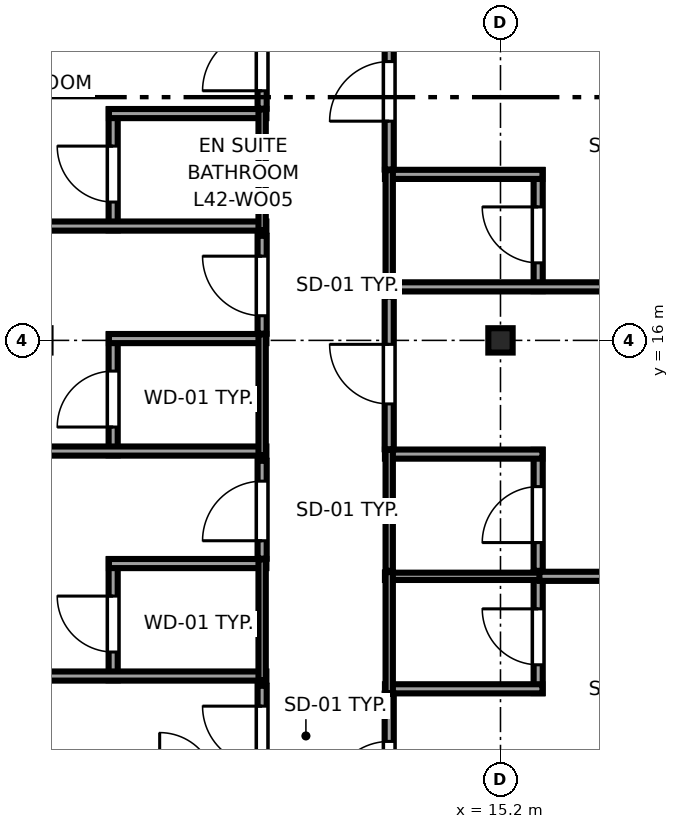
"""IFC4 building model, lengths in metres.
Left out: names, types, materials, properties, quantities, classifications, styles, units other than length and angle.
Written with IfcOpenShell. Run it as: python <this file> out.ifc"""

import sys

from ifc_helpers import new_model, si_unit, direction, frame, frame_2d, origin, origin_2d, place, context, subcontext, project, spatial, rectangle, i_section, extrude, source, transform, mapped, element, fill, save


model = new_model("IFC4")
c1 = context("Model", 3, precision=1e-05, world=origin(), true_north=direction((0.0, 1.0)))
c2 = subcontext(c1, "Body", "Model", "MODEL_VIEW")
j1 = project(units=[si_unit("LENGTHUNIT", "METRE"), si_unit("PLANEANGLEUNIT", "RADIAN")], contexts=[c1])
p1 = place(None, origin())
s1 = spatial("IfcSite", under=j1, at=p1, CompositionType="ELEMENT")
p2 = place(p1, origin())
s2 = spatial("IfcBuilding", under=s1, at=p2, CompositionType="ELEMENT")
p3 = place(p2, frame((0.0, 0.0, 161.25)))
s3 = spatial("IfcBuildingStorey", under=s2, at=p3, CompositionType="ELEMENT", Elevation=161.25)
m1 = source(origin(), c2, "Body", "SweptSolid", [
    extrude(i_section(OverallWidth=0.4, OverallDepth=0.4, WebThickness=0.02, FlangeThickness=0.035, at=origin_2d()), origin(), (0.0, 0.0, 1.0), 3.55),
])
p4 = place(p3, frame((15.2, 16.0, 0.0), z_axis=(0.0, 0.0, 1.0), x_axis=(1.0, 0.0, 0.0)))
e1 = element("IfcColumn", 1, at=p4, inside=s3, PredefinedType="COLUMN", context=c2, shape_type="MappedRepresentation", body=[
    mapped(m1, transform((0.0, 0.0, 0.0), x_axis=(1.0, 0.0, 0.0), y_axis=(0.0, 1.0, 0.0), z_axis=(0.0, 0.0, 1.0), scale=1.0)),
])
p5 = place(p3, frame((8.83, 10.41, 0.0), z_axis=(0.0, 0.0, 1.0), x_axis=(0.0, 1.0, 0.0)))
e2 = element("IfcWall", 2, at=p5, inside=s3, PredefinedType="PARTITIONING", context=c2, shape_type="SweptSolid", body=[
    extrude(rectangle(XDim=1.99, YDim=0.15, at=frame_2d((0.995, 0.0))), origin(), (0.0, 0.0, 1.0), 3.37),
])
p6 = place(p5, frame((0.465, 0.0, 0.0)))
e3 = element("IfcOpeningElement", 3, at=p6, cuts=e2, PredefinedType="OPENING", context=c2, shape_type="SweptSolid", body=[
    extrude(rectangle(XDim=0.92, YDim=2.01, at=frame_2d((0.46, 1.005))), frame((0.0, 0.085, 0.0), z_axis=(0.0, -1.0, 0.0), x_axis=(1.0, 0.0, 0.0)), (0.0, 0.0, 1.0), 0.17),
])
p7 = place(p3, frame((3.005, 10.48, 0.0), z_axis=(0.0, 0.0, 1.0), x_axis=(1.0, 0.0, 0.0)))
e4 = element("IfcWall", 4, at=p7, inside=s3, PredefinedType="PARTITIONING", context=c2, shape_type="SweptSolid", body=[
    extrude(rectangle(XDim=8.345, YDim=0.15, at=frame_2d((4.173, 0.0))), origin(), (0.0, 0.0, 1.0), 3.37),
])
p8 = place(p3, frame((8.76, 12.33, 0.0), z_axis=(0.0, 0.0, 1.0), x_axis=(1.0, 0.0, 0.0)))
e5 = element("IfcWall", 5, at=p8, inside=s3, PredefinedType="PARTITIONING", context=c2, shape_type="SweptSolid", body=[
    extrude(rectangle(XDim=2.59, YDim=0.15, at=frame_2d((1.295, 0.0))), origin(), (0.0, 0.0, 1.0), 3.37),
])
p9 = place(p3, frame((11.28, 10.41, 0.0), z_axis=(0.0, 0.0, 1.0), x_axis=(0.0, 1.0, 0.0)))
e6 = element("IfcWall", 6, at=p9, inside=s3, PredefinedType="PLUMBINGWALL", context=c2, shape_type="SweptSolid", body=[
    extrude(rectangle(XDim=1.99, YDim=0.12, at=frame_2d((0.995, 0.0))), origin(), (0.0, 0.0, 1.0), 3.001),
])
p10 = place(p3, frame((8.83, 14.11, 0.0), z_axis=(0.0, 0.0, 1.0), x_axis=(0.0, 1.0, 0.0)))
e7 = element("IfcWall", 7, at=p10, inside=s3, PredefinedType="PARTITIONING", context=c2, shape_type="SweptSolid", body=[
    extrude(rectangle(XDim=1.99, YDim=0.15, at=frame_2d((0.995, 0.0))), origin(), (0.0, 0.0, 1.0), 3.37),
])
p11 = place(p10, frame((0.465, 0.0, 0.0)))
e8 = element("IfcOpeningElement", 8, at=p11, cuts=e7, PredefinedType="OPENING", context=c2, shape_type="SweptSolid", body=[
    extrude(rectangle(XDim=0.92, YDim=2.01, at=frame_2d((0.46, 1.005))), frame((0.0, 0.085, 0.0), z_axis=(0.0, -1.0, 0.0), x_axis=(1.0, 0.0, 0.0)), (0.0, 0.0, 1.0), 0.17),
])
p12 = place(p3, frame((3.005, 14.18, 0.0), z_axis=(0.0, 0.0, 1.0), x_axis=(1.0, 0.0, 0.0)))
e9 = element("IfcWall", 9, at=p12, inside=s3, PredefinedType="PARTITIONING", context=c2, shape_type="SweptSolid", body=[
    extrude(rectangle(XDim=8.345, YDim=0.15, at=frame_2d((4.173, 0.0))), origin(), (0.0, 0.0, 1.0), 3.37),
])
p13 = place(p3, frame((8.76, 16.03, 0.0), z_axis=(0.0, 0.0, 1.0), x_axis=(1.0, 0.0, 0.0)))
e10 = element("IfcWall", 10, at=p13, inside=s3, PredefinedType="PARTITIONING", context=c2, shape_type="SweptSolid", body=[
    extrude(rectangle(XDim=2.59, YDim=0.15, at=frame_2d((1.295, 0.0))), origin(), (0.0, 0.0, 1.0), 2.758),
])
p14 = place(p3, frame((11.28, 14.11, 0.0), z_axis=(0.0, 0.0, 1.0), x_axis=(0.0, 1.0, 0.0)))
e11 = element("IfcWall", 11, at=p14, inside=s3, PredefinedType="PLUMBINGWALL", context=c2, shape_type="SweptSolid", body=[
    extrude(rectangle(XDim=1.99, YDim=0.12, at=frame_2d((0.995, 0.0))), origin(), (0.0, 0.0, 1.0), 3.001),
])
p15 = place(p3, frame((8.83, 17.81, 0.0), z_axis=(0.0, 0.0, 1.0), x_axis=(0.0, 1.0, 0.0)))
e12 = element("IfcWall", 12, at=p15, inside=s3, PredefinedType="PARTITIONING", context=c2, shape_type="SweptSolid", body=[
    extrude(rectangle(XDim=1.99, YDim=0.15, at=frame_2d((0.995, 0.0))), origin(), (0.0, 0.0, 1.0), 3.37),
])
p16 = place(p15, frame((0.465, 0.0, 0.0)))
e13 = element("IfcOpeningElement", 13, at=p16, cuts=e12, PredefinedType="OPENING", context=c2, shape_type="SweptSolid", body=[
    extrude(rectangle(XDim=0.92, YDim=2.01, at=frame_2d((0.46, 1.005))), frame((0.0, 0.085, 0.0), z_axis=(0.0, -1.0, 0.0), x_axis=(1.0, 0.0, 0.0)), (0.0, 0.0, 1.0), 0.17),
])
p17 = place(p3, frame((3.005, 17.88, 0.0), z_axis=(0.0, 0.0, 1.0), x_axis=(1.0, 0.0, 0.0)))
e14 = element("IfcWall", 14, at=p17, inside=s3, PredefinedType="PARTITIONING", context=c2, shape_type="SweptSolid", body=[
    extrude(rectangle(XDim=8.345, YDim=0.15, at=frame_2d((4.173, 0.0))), origin(), (0.0, 0.0, 1.0), 3.37),
])
p18 = place(p3, frame((8.76, 19.73, 0.0), z_axis=(0.0, 0.0, 1.0), x_axis=(1.0, 0.0, 0.0)))
e15 = element("IfcWall", 15, at=p18, inside=s3, PredefinedType="PARTITIONING", context=c2, shape_type="SweptSolid", body=[
    extrude(rectangle(XDim=2.59, YDim=0.15, at=frame_2d((1.295, 0.0))), origin(), (0.0, 0.0, 1.0), 3.37),
])
p19 = place(p3, frame((11.28, 17.81, 0.0), z_axis=(0.0, 0.0, 1.0), x_axis=(0.0, 1.0, 0.0)))
e16 = element("IfcWall", 16, at=p19, inside=s3, PredefinedType="PLUMBINGWALL", context=c2, shape_type="SweptSolid", body=[
    extrude(rectangle(XDim=1.99, YDim=0.12, at=frame_2d((0.995, 0.0))), origin(), (0.0, 0.0, 1.0), 3.001),
])
p20 = place(p3, frame((15.82, 10.2, 0.0), z_axis=(0.0, 0.0, 1.0), x_axis=(0.0, 1.0, 0.0)))
e17 = element("IfcWall", 17, at=p20, inside=s3, PredefinedType="PARTITIONING", context=c2, shape_type="SweptSolid", body=[
    extrude(rectangle(XDim=1.99, YDim=0.15, at=frame_2d((0.995, 0.0))), origin(), (0.0, 0.0, 1.0), 3.37),
])
p21 = place(p20, frame((0.465, 0.0, 0.0)))
e18 = element("IfcOpeningElement", 18, at=p21, cuts=e17, PredefinedType="OPENING", context=c2, shape_type="SweptSolid", body=[
    extrude(rectangle(XDim=0.92, YDim=2.01, at=frame_2d((0.46, 1.005))), frame((0.0, 0.085, 0.0), z_axis=(0.0, -1.0, 0.0), x_axis=(1.0, 0.0, 0.0)), (0.0, 0.0, 1.0), 0.17),
])
p22 = place(p3, frame((13.3, 10.27, 0.0), z_axis=(0.0, 0.0, 1.0), x_axis=(1.0, 0.0, 0.0)))
e19 = element("IfcWall", 19, at=p22, inside=s3, PredefinedType="PARTITIONING", context=c2, shape_type="SweptSolid", body=[
    extrude(rectangle(XDim=2.59, YDim=0.15, at=frame_2d((1.295, 0.0))), origin(), (0.0, 0.0, 1.0), 3.37),
])
p23 = place(p3, frame((13.3, 12.12, 0.0), z_axis=(0.0, 0.0, 1.0), x_axis=(1.0, 0.0, 0.0)))
e20 = element("IfcWall", 20, at=p23, inside=s3, PredefinedType="PLUMBINGWALL", context=c2, shape_type="SweptSolid", body=[
    extrude(rectangle(XDim=2.59, YDim=0.12, at=frame_2d((1.295, 0.0))), origin(), (0.0, 0.0, 1.0), 3.37),
])
p24 = place(p3, frame((13.37, 10.2, 0.0), z_axis=(0.0, 0.0, 1.0), x_axis=(0.0, 1.0, 0.0)))
e21 = element("IfcWall", 21, at=p24, inside=s3, PredefinedType="PLUMBINGWALL", context=c2, shape_type="SweptSolid", body=[
    extrude(rectangle(XDim=1.99, YDim=0.12, at=frame_2d((0.995, 0.0))), origin(), (0.0, 0.0, 1.0), 3.37),
])
p25 = place(p3, frame((15.82, 12.21, 0.0), z_axis=(0.0, 0.0, 1.0), x_axis=(0.0, 1.0, 0.0)))
e22 = element("IfcWall", 22, at=p25, inside=s3, PredefinedType="PARTITIONING", context=c2, shape_type="SweptSolid", body=[
    extrude(rectangle(XDim=1.99, YDim=0.15, at=frame_2d((0.995, 0.0))), origin(), (0.0, 0.0, 1.0), 3.37),
])
p26 = place(p25, frame((0.465, 0.0, 0.0)))
e23 = element("IfcOpeningElement", 23, at=p26, cuts=e22, PredefinedType="OPENING", context=c2, shape_type="SweptSolid", body=[
    extrude(rectangle(XDim=0.92, YDim=2.01, at=frame_2d((0.46, 1.005))), frame((0.0, 0.085, 0.0), z_axis=(0.0, -1.0, 0.0), x_axis=(1.0, 0.0, 0.0)), (0.0, 0.0, 1.0), 0.17),
])
p27 = place(p3, frame((13.3, 14.13, 0.0), z_axis=(0.0, 0.0, 1.0), x_axis=(1.0, 0.0, 0.0)))
e24 = element("IfcWall", 24, at=p27, inside=s3, PredefinedType="PARTITIONING", context=c2, shape_type="SweptSolid", body=[
    extrude(rectangle(XDim=2.59, YDim=0.15, at=frame_2d((1.295, 0.0))), origin(), (0.0, 0.0, 1.0), 3.37),
])
p28 = place(p3, frame((13.37, 12.21, 0.0), z_axis=(0.0, 0.0, 1.0), x_axis=(0.0, 1.0, 0.0)))
e25 = element("IfcWall", 25, at=p28, inside=s3, PredefinedType="PLUMBINGWALL", context=c2, shape_type="SweptSolid", body=[
    extrude(rectangle(XDim=1.99, YDim=0.12, at=frame_2d((0.995, 0.0))), origin(), (0.0, 0.0, 1.0), 3.37),
])
p29 = place(p3, frame((15.82, 16.81, 0.0), z_axis=(0.0, 0.0, 1.0), x_axis=(0.0, 1.0, 0.0)))
e26 = element("IfcWall", 26, at=p29, inside=s3, PredefinedType="PARTITIONING", context=c2, shape_type="SweptSolid", body=[
    extrude(rectangle(XDim=1.99, YDim=0.15, at=frame_2d((0.995, 0.0))), origin(), (0.0, 0.0, 1.0), 3.37),
])
p30 = place(p29, frame((0.465, 0.0, 0.0)))
e27 = element("IfcOpeningElement", 27, at=p30, cuts=e26, PredefinedType="OPENING", context=c2, shape_type="SweptSolid", body=[
    extrude(rectangle(XDim=0.92, YDim=2.01, at=frame_2d((0.46, 1.005))), frame((0.0, 0.085, 0.0), z_axis=(0.0, -1.0, 0.0), x_axis=(1.0, 0.0, 0.0)), (0.0, 0.0, 1.0), 0.17),
])
p31 = place(p3, frame((13.3, 16.88, 0.0), z_axis=(0.0, 0.0, 1.0), x_axis=(1.0, 0.0, 0.0)))
e28 = element("IfcWall", 28, at=p31, inside=s3, PredefinedType="PARTITIONING", context=c2, shape_type="SweptSolid", body=[
    extrude(rectangle(XDim=9.05, YDim=0.15, at=frame_2d((4.525, 0.0))), origin(), (0.0, 0.0, 1.0), 3.37),
])
p32 = place(p3, frame((13.3, 18.73, 0.0), z_axis=(0.0, 0.0, 1.0), x_axis=(1.0, 0.0, 0.0)))
e29 = element("IfcWall", 29, at=p32, inside=s3, PredefinedType="PARTITIONING", context=c2, shape_type="SweptSolid", body=[
    extrude(rectangle(XDim=2.59, YDim=0.15, at=frame_2d((1.295, 0.0))), origin(), (0.0, 0.0, 1.0), 3.37),
])
p33 = place(p3, frame((13.37, 16.81, 0.0), z_axis=(0.0, 0.0, 1.0), x_axis=(0.0, 1.0, 0.0)))
e30 = element("IfcWall", 30, at=p33, inside=s3, PredefinedType="PLUMBINGWALL", context=c2, shape_type="SweptSolid", body=[
    extrude(rectangle(XDim=1.99, YDim=0.12, at=frame_2d((0.995, 0.0))), origin(), (0.0, 0.0, 1.0), 3.37),
])
p34 = place(p3, frame((11.28, 8.71, 0.0), z_axis=(0.0, 0.0, 1.0), x_axis=(0.0, 1.0, 0.0)))
e31 = element("IfcWall", 31, at=p34, inside=s3, PredefinedType="PARTITIONING", context=c2, shape_type="SweptSolid", body=[
    extrude(rectangle(XDim=1.61, YDim=0.15, at=frame_2d((0.805, 0.0))), origin(), (0.0, 0.0, 1.0), 3.001),
])
p35 = place(p34, frame((0.295, 0.0, 0.0)))
e32 = element("IfcOpeningElement", 32, at=p35, cuts=e31, PredefinedType="OPENING", context=c2, shape_type="SweptSolid", body=[
    extrude(rectangle(XDim=0.98, YDim=2.12, at=frame_2d((0.49, 1.06))), frame((0.0, 0.085, 0.0), z_axis=(0.0, -1.0, 0.0), x_axis=(1.0, 0.0, 0.0)), (0.0, 0.0, 1.0), 0.17),
])
p36 = place(p3, frame((11.28, 12.41, 0.0), z_axis=(0.0, 0.0, 1.0), x_axis=(0.0, 1.0, 0.0)))
e33 = element("IfcWall", 33, at=p36, inside=s3, PredefinedType="PARTITIONING", context=c2, shape_type="SweptSolid", body=[
    extrude(rectangle(XDim=1.61, YDim=0.15, at=frame_2d((0.805, 0.0))), origin(), (0.0, 0.0, 1.0), 3.001),
])
p37 = place(p36, frame((0.295, 0.0, 0.0)))
e34 = element("IfcOpeningElement", 34, at=p37, cuts=e33, PredefinedType="OPENING", context=c2, shape_type="SweptSolid", body=[
    extrude(rectangle(XDim=0.98, YDim=2.12, at=frame_2d((0.49, 1.06))), frame((0.0, 0.085, 0.0), z_axis=(0.0, -1.0, 0.0), x_axis=(1.0, 0.0, 0.0)), (0.0, 0.0, 1.0), 0.17),
])
p38 = place(p3, frame((11.28, 16.11, 0.0), z_axis=(0.0, 0.0, 1.0), x_axis=(0.0, 1.0, 0.0)))
e35 = element("IfcWall", 35, at=p38, inside=s3, PredefinedType="PARTITIONING", context=c2, shape_type="SweptSolid", body=[
    extrude(rectangle(XDim=1.61, YDim=0.15, at=frame_2d((0.805, 0.0))), origin(), (0.0, 0.0, 1.0), 3.001),
])
p39 = place(p38, frame((0.295, 0.0, 0.0)))
e36 = element("IfcOpeningElement", 36, at=p39, cuts=e35, PredefinedType="OPENING", context=c2, shape_type="SweptSolid", body=[
    extrude(rectangle(XDim=0.98, YDim=2.12, at=frame_2d((0.49, 1.06))), frame((0.0, 0.085, 0.0), z_axis=(0.0, -1.0, 0.0), x_axis=(1.0, 0.0, 0.0)), (0.0, 0.0, 1.0), 0.17),
])
p40 = place(p3, frame((11.28, 19.81, 0.0), z_axis=(0.0, 0.0, 1.0), x_axis=(0.0, 1.0, 0.0)))
e37 = element("IfcWall", 37, at=p40, inside=s3, PredefinedType="PARTITIONING", context=c2, shape_type="SweptSolid", body=[
    extrude(rectangle(XDim=1.61, YDim=0.15, at=frame_2d((0.805, 0.0))), origin(), (0.0, 0.0, 1.0), 3.001),
])
p41 = place(p40, frame((0.295, 0.0, 0.0)))
e38 = element("IfcOpeningElement", 38, at=p41, cuts=e37, PredefinedType="OPENING", context=c2, shape_type="SweptSolid", body=[
    extrude(rectangle(XDim=0.98, YDim=2.12, at=frame_2d((0.49, 1.06))), frame((0.0, 0.085, 0.0), z_axis=(0.0, -1.0, 0.0), x_axis=(1.0, 0.0, 0.0)), (0.0, 0.0, 1.0), 0.17),
])
p42 = place(p3, frame((13.37, 7.68, 0.0), z_axis=(0.0, 0.0, 1.0), x_axis=(0.0, 1.0, 0.0)))
e39 = element("IfcWall", 39, at=p42, inside=s3, PredefinedType="PARTITIONING", context=c2, shape_type="SweptSolid", body=[
    extrude(rectangle(XDim=2.51, YDim=0.15, at=frame_2d((1.255, 0.0))), origin(), (0.0, 0.0, 1.0), 3.37),
])
p43 = place(p42, frame((0.745, 0.0, 0.0)))
e40 = element("IfcOpeningElement", 40, at=p43, cuts=e39, PredefinedType="OPENING", context=c2, shape_type="SweptSolid", body=[
    extrude(rectangle(XDim=0.98, YDim=2.12, at=frame_2d((0.49, 1.06))), frame((0.0, 0.085, 0.0), z_axis=(0.0, -1.0, 0.0), x_axis=(1.0, 0.0, 0.0)), (0.0, 0.0, 1.0), 0.17),
])
p44 = place(p3, frame((15.84, 12.12, 0.0), z_axis=(0.0, 0.0, 1.0), x_axis=(1.0, 0.0, 0.0)))
e41 = element("IfcWall", 41, at=p44, inside=s3, PredefinedType="PARTITIONING", context=c2, shape_type="SweptSolid", body=[
    extrude(rectangle(XDim=6.51, YDim=0.15, at=frame_2d((3.255, 0.0))), origin(), (0.0, 0.0, 1.0), 3.37),
])
p45 = place(p3, frame((13.37, 14.21, 0.0), z_axis=(0.0, 0.0, 1.0), x_axis=(0.0, 1.0, 0.0)))
e42 = element("IfcWall", 42, at=p45, inside=s3, PredefinedType="PARTITIONING", context=c2, shape_type="SweptSolid", body=[
    extrude(rectangle(XDim=2.51, YDim=0.15, at=frame_2d((1.255, 0.0))), origin(), (0.0, 0.0, 1.0), 3.37),
])
p46 = place(p45, frame((0.745, 0.0, 0.0)))
e43 = element("IfcOpeningElement", 43, at=p46, cuts=e42, PredefinedType="OPENING", context=c2, shape_type="SweptSolid", body=[
    extrude(rectangle(XDim=0.98, YDim=2.12, at=frame_2d((0.49, 1.06))), frame((0.0, 0.085, 0.0), z_axis=(0.0, -1.0, 0.0), x_axis=(1.0, 0.0, 0.0)), (0.0, 0.0, 1.0), 0.17),
])
p47 = place(p3, frame((13.37, 18.81, 0.0), z_axis=(0.0, 0.0, 1.0), x_axis=(0.0, 1.0, 0.0)))
e44 = element("IfcWall", 44, at=p47, inside=s3, PredefinedType="PARTITIONING", context=c2, shape_type="SweptSolid", body=[
    extrude(rectangle(XDim=2.61, YDim=0.15, at=frame_2d((1.305, 0.0))), origin(), (0.0, 0.0, 1.0), 3.37),
])
p48 = place(p47, frame((0.795, 0.0, 0.0)))
e45 = element("IfcOpeningElement", 45, at=p48, cuts=e44, PredefinedType="OPENING", context=c2, shape_type="SweptSolid", body=[
    extrude(rectangle(XDim=0.98, YDim=2.12, at=frame_2d((0.49, 1.06))), frame((0.0, 0.085, 0.0), z_axis=(0.0, -1.0, 0.0), x_axis=(1.0, 0.0, 0.0)), (0.0, 0.0, 1.0), 0.17),
])
m2 = source(origin(), c2, "Body", "SweptSolid", [
    extrude(rectangle(XDim=0.92, YDim=2.01, at=frame_2d((0.46, 1.005))), frame((0.0, 0.025, 0.0), z_axis=(0.0, -1.0, 0.0), x_axis=(1.0, 0.0, 0.0)), (0.0, 0.0, 1.0), 0.05),
])
p49 = place(p6, origin())
e46 = element("IfcDoor", 46, at=p49, inside=s3, OperationType="SINGLE_SWING_RIGHT", PredefinedType="DOOR", context=c2, shape_type="MappedRepresentation", body=[
    mapped(m2, transform((0.0, 0.0, 0.0), x_axis=(1.0, 0.0, 0.0), y_axis=(0.0, 1.0, 0.0), z_axis=(0.0, 0.0, 1.0), scale=1.0)),
])
fill(e3, e46)
p50 = place(p11, origin())
e47 = element("IfcDoor", 47, at=p50, inside=s3, OperationType="SINGLE_SWING_LEFT", PredefinedType="DOOR", context=c2, shape_type="MappedRepresentation", body=[
    mapped(m2, transform((0.0, 0.0, 0.0), x_axis=(1.0, 0.0, 0.0), y_axis=(0.0, 1.0, 0.0), z_axis=(0.0, 0.0, 1.0), scale=1.0)),
])
fill(e8, e47)
p51 = place(p16, origin())
e48 = element("IfcDoor", 48, at=p51, inside=s3, OperationType="SINGLE_SWING_RIGHT", PredefinedType="DOOR", context=c2, shape_type="MappedRepresentation", body=[
    mapped(m2, transform((0.0, 0.0, 0.0), x_axis=(1.0, 0.0, 0.0), y_axis=(0.0, 1.0, 0.0), z_axis=(0.0, 0.0, 1.0), scale=1.0)),
])
fill(e13, e48)
p52 = place(p21, origin())
e49 = element("IfcDoor", 49, at=p52, inside=s3, OperationType="SINGLE_SWING_RIGHT", PredefinedType="DOOR", context=c2, shape_type="MappedRepresentation", body=[
    mapped(m2, transform((0.0, 0.0, 0.0), x_axis=(1.0, 0.0, 0.0), y_axis=(0.0, 1.0, 0.0), z_axis=(0.0, 0.0, 1.0), scale=1.0)),
])
fill(e18, e49)
p53 = place(p26, origin())
e50 = element("IfcDoor", 50, at=p53, inside=s3, OperationType="SINGLE_SWING_LEFT", PredefinedType="DOOR", context=c2, shape_type="MappedRepresentation", body=[
    mapped(m2, transform((0.0, 0.0, 0.0), x_axis=(1.0, 0.0, 0.0), y_axis=(0.0, 1.0, 0.0), z_axis=(0.0, 0.0, 1.0), scale=1.0)),
])
fill(e23, e50)
p54 = place(p30, origin())
e51 = element("IfcDoor", 51, at=p54, inside=s3, OperationType="SINGLE_SWING_RIGHT", PredefinedType="DOOR", context=c2, shape_type="MappedRepresentation", body=[
    mapped(m2, transform((0.0, 0.0, 0.0), x_axis=(1.0, 0.0, 0.0), y_axis=(0.0, 1.0, 0.0), z_axis=(0.0, 0.0, 1.0), scale=1.0)),
])
fill(e27, e51)
m3 = source(origin(), c2, "Body", "SweptSolid", [
    extrude(rectangle(XDim=0.98, YDim=2.12, at=frame_2d((0.49, 1.06))), frame((0.0, 0.025, 0.0), z_axis=(0.0, -1.0, 0.0), x_axis=(1.0, 0.0, 0.0)), (0.0, 0.0, 1.0), 0.05),
])
p55 = place(p35, origin())
e52 = element("IfcDoor", 52, at=p55, inside=s3, OperationType="SINGLE_SWING_RIGHT", PredefinedType="DOOR", context=c2, shape_type="MappedRepresentation", body=[
    mapped(m3, transform((0.0, 0.0, 0.0), x_axis=(1.0, 0.0, 0.0), y_axis=(0.0, 1.0, 0.0), z_axis=(0.0, 0.0, 1.0), scale=1.0)),
])
fill(e32, e52)
p56 = place(p37, origin())
e53 = element("IfcDoor", 53, at=p56, inside=s3, OperationType="SINGLE_SWING_LEFT", PredefinedType="DOOR", context=c2, shape_type="MappedRepresentation", body=[
    mapped(m3, transform((0.0, 0.0, 0.0), x_axis=(1.0, 0.0, 0.0), y_axis=(0.0, 1.0, 0.0), z_axis=(0.0, 0.0, 1.0), scale=1.0)),
])
fill(e34, e53)
p57 = place(p39, origin())
e54 = element("IfcDoor", 54, at=p57, inside=s3, OperationType="SINGLE_SWING_RIGHT", PredefinedType="DOOR", context=c2, shape_type="MappedRepresentation", body=[
    mapped(m3, transform((0.0, 0.0, 0.0), x_axis=(1.0, 0.0, 0.0), y_axis=(0.0, 1.0, 0.0), z_axis=(0.0, 0.0, 1.0), scale=1.0)),
])
fill(e36, e54)
p58 = place(p41, origin())
e55 = element("IfcDoor", 55, at=p58, inside=s3, OperationType="SINGLE_SWING_LEFT", PredefinedType="DOOR", context=c2, shape_type="MappedRepresentation", body=[
    mapped(m3, transform((0.0, 0.0, 0.0), x_axis=(1.0, 0.0, 0.0), y_axis=(0.0, 1.0, 0.0), z_axis=(0.0, 0.0, 1.0), scale=1.0)),
])
fill(e38, e55)
p59 = place(p43, origin())
e56 = element("IfcDoor", 56, at=p59, inside=s3, OperationType="SINGLE_SWING_LEFT", PredefinedType="DOOR", context=c2, shape_type="MappedRepresentation", body=[
    mapped(m3, transform((0.0, 0.0, 0.0), x_axis=(1.0, 0.0, 0.0), y_axis=(0.0, 1.0, 0.0), z_axis=(0.0, 0.0, 1.0), scale=1.0)),
])
fill(e40, e56)
p60 = place(p46, origin())
e57 = element("IfcDoor", 57, at=p60, inside=s3, OperationType="SINGLE_SWING_RIGHT", PredefinedType="DOOR", context=c2, shape_type="MappedRepresentation", body=[
    mapped(m3, transform((0.0, 0.0, 0.0), x_axis=(1.0, 0.0, 0.0), y_axis=(0.0, 1.0, 0.0), z_axis=(0.0, 0.0, 1.0), scale=1.0)),
])
fill(e43, e57)
p61 = place(p48, origin())
e58 = element("IfcDoor", 58, at=p61, inside=s3, OperationType="SINGLE_SWING_LEFT", PredefinedType="DOOR", context=c2, shape_type="MappedRepresentation", body=[
    mapped(m3, transform((0.0, 0.0, 0.0), x_axis=(1.0, 0.0, 0.0), y_axis=(0.0, 1.0, 0.0), z_axis=(0.0, 0.0, 1.0), scale=1.0)),
])
fill(e45, e58)
save(model, sys.argv[1])
